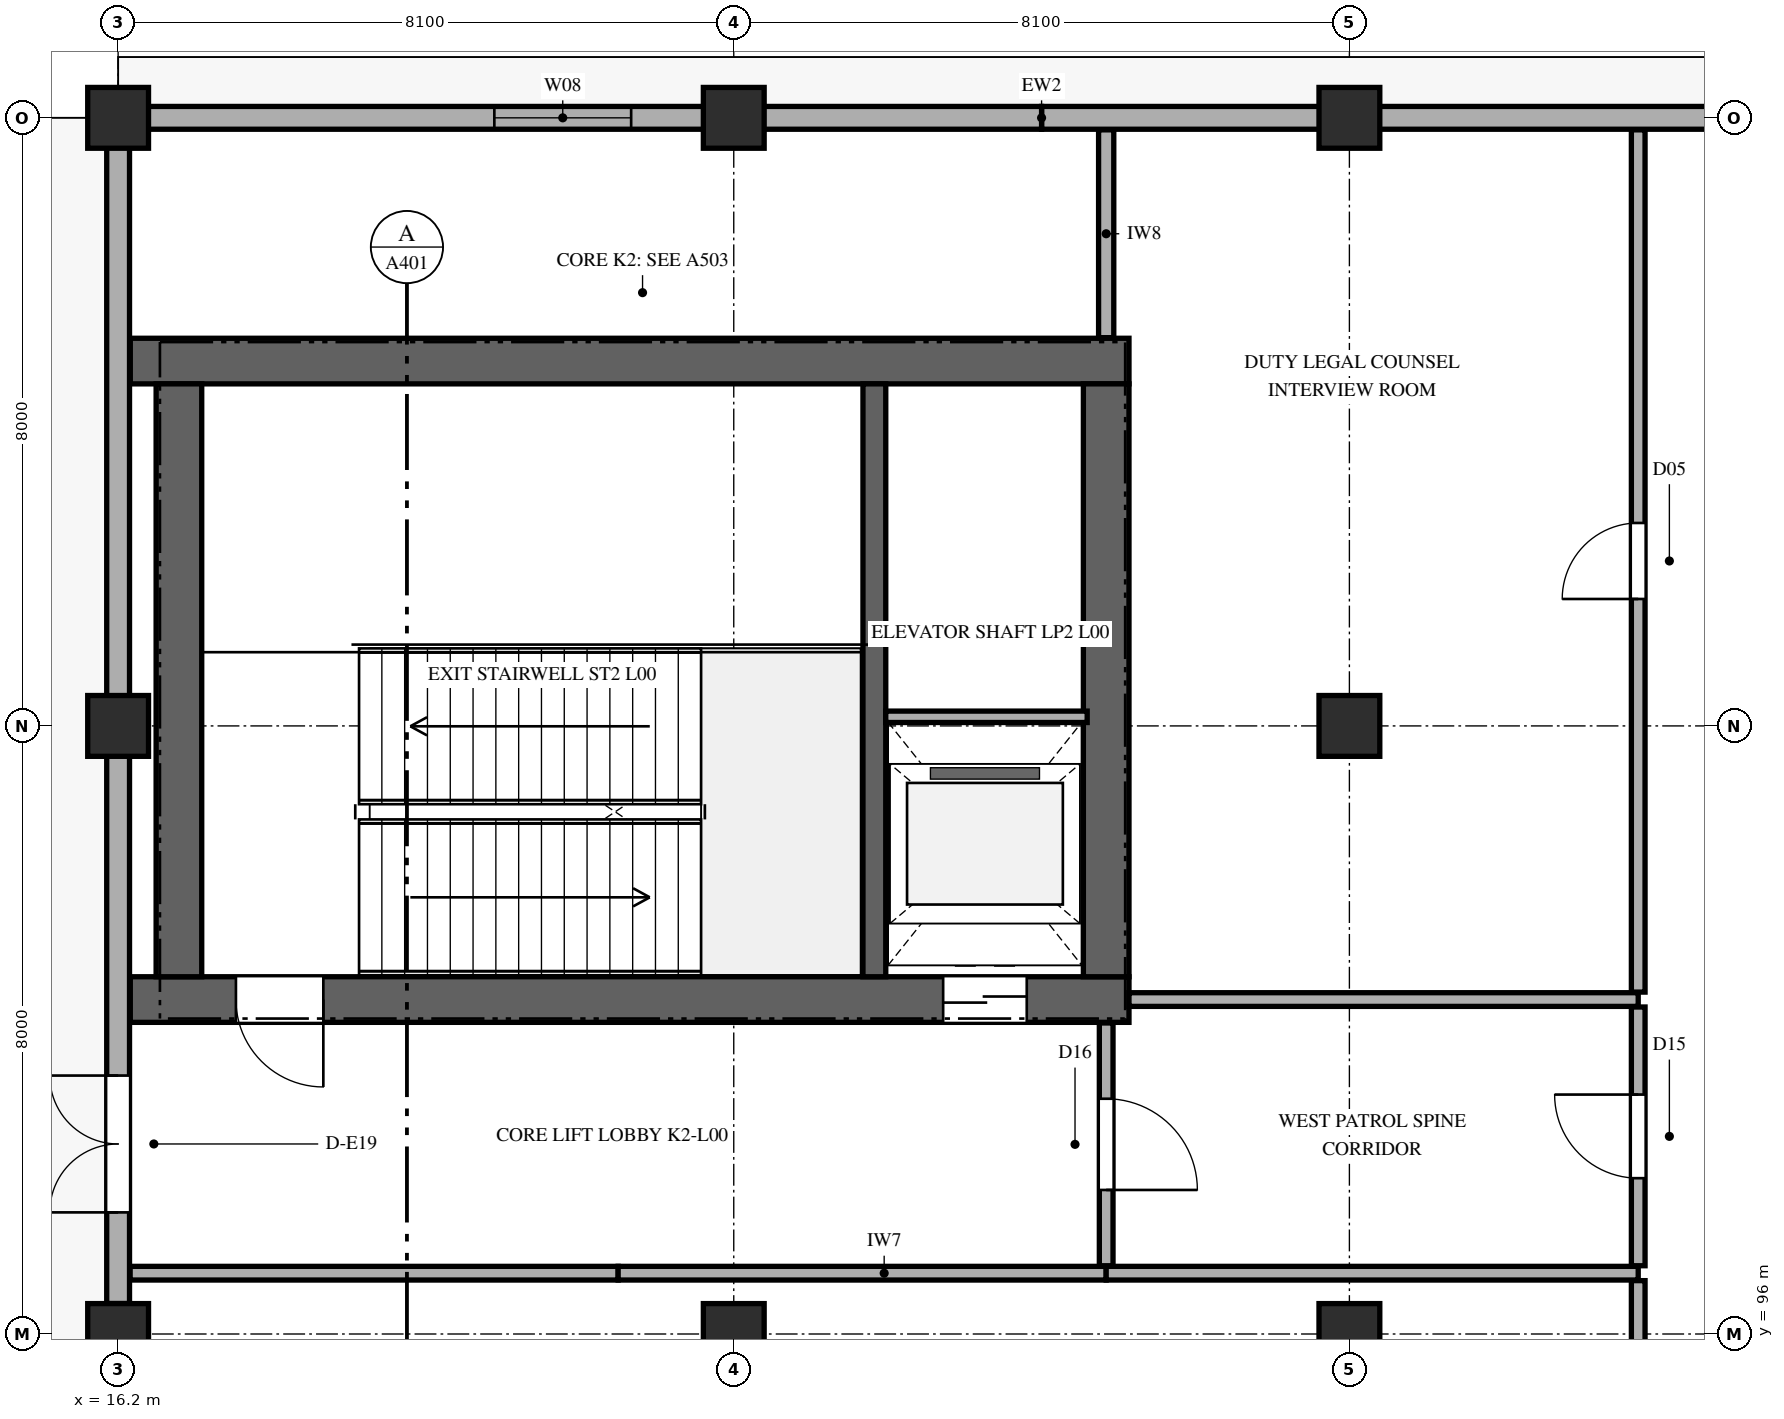
"""IFC4 building model, lengths in metres.
Left out: names, types, materials, properties, quantities, classifications, styles, units other than length and angle.
Written with IfcOpenShell. Run it as: python <this file> out.ifc"""

import sys

from ifc_helpers import new_model, si_unit, direction, frame, frame_2d, origin, origin_2d, place, context, subcontext, project, spatial, rectangle, extrude, element, fill, save


model = new_model("IFC4")
c1 = context("Model", 3, precision=1e-05, world=origin(), true_north=direction((0.0, 1.0)))
c2 = subcontext(c1, "Body", "Model", "MODEL_VIEW")
j1 = project(units=[si_unit("LENGTHUNIT", "METRE"), si_unit("PLANEANGLEUNIT", "RADIAN")], contexts=[c1])
p1 = place(None, origin())
s1 = spatial("IfcSite", under=j1, at=p1, CompositionType="ELEMENT")
p2 = place(p1, origin())
s2 = spatial("IfcBuilding", under=s1, at=p2, CompositionType="ELEMENT")
p3 = place(p2, origin())
s3 = spatial("IfcBuildingStorey", under=s2, at=p3, CompositionType="ELEMENT", Elevation=0.0)
p4 = place(p3, frame((16.36, 100.4, 0.0), z_axis=(0.0, 0.0, 1.0), x_axis=(1.0, 0.0, 0.0)))
e1 = element("IfcWall", 1, at=p4, inside=s3, PredefinedType="SHEAR", context=c2, shape_type="SweptSolid", body=[
    extrude(rectangle(XDim=13.14, YDim=0.6, at=frame_2d((6.57, 0.0))), origin(), (0.0, 0.0, 1.0), 5.4),
])
p5 = place(p4, frame((1.39, 0.0, 0.0)))
e2 = element("IfcOpeningElement", 2, at=p5, cuts=e1, PredefinedType="OPENING", context=c2, shape_type="SweptSolid", body=[
    extrude(rectangle(XDim=1.15, YDim=2.25, at=frame_2d((0.575, 1.125))), frame((0.0, 0.31, 0.0), z_axis=(0.0, -1.0, 0.0), x_axis=(1.0, 0.0, 0.0)), (0.0, 0.0, 1.0), 0.62),
])
p6 = place(p4, frame((10.695, 0.0, 0.0)))
e3 = element("IfcOpeningElement", 3, at=p6, cuts=e1, PredefinedType="OPENING", context=c2, shape_type="SweptSolid", body=[
    extrude(rectangle(XDim=1.1, YDim=2.2, at=frame_2d((0.55, 1.1))), frame((0.0, 0.31, 0.0), z_axis=(0.0, -1.0, 0.0), x_axis=(1.0, 0.0, 0.0)), (0.0, 0.0, 1.0), 0.62),
])
p7 = place(p3, frame((16.36, 108.8, 0.0), z_axis=(0.0, 0.0, 1.0), x_axis=(1.0, 0.0, 0.0)))
e4 = element("IfcWall", 4, at=p7, inside=s3, PredefinedType="SHEAR", context=c2, shape_type="SweptSolid", body=[
    extrude(rectangle(XDim=13.14, YDim=0.6, at=frame_2d((6.57, 0.0))), origin(), (0.0, 0.0, 1.0), 5.4),
])
for number, where, z_axis, x_axis in (
    (5, (17.0, 100.7, 0.0), (0.0, 0.0, 1.0), (0.0, 1.0, 0.0)),
    (6, (29.2, 100.7, 0.0), (0.0, 0.0, 1.0), (0.0, 1.0, 0.0)),
):
    element("IfcWall", number, at=place(p3, frame(where, z_axis=z_axis, x_axis=x_axis)), inside=s3, PredefinedType="SHEAR", context=c2, shape_type="SweptSolid", body=[
        extrude(rectangle(XDim=7.8, YDim=0.6, at=frame_2d((3.9, 0.0))), origin(), (0.0, 0.0, 1.0), 5.4),
    ])
p8 = place(p3, frame((26.15, 100.7, 0.0), z_axis=(0.0, 0.0, 1.0), x_axis=(0.0, 1.0, 0.0)))
e7 = element("IfcWall", 7, at=p8, inside=s3, PredefinedType="SHEAR", context=c2, shape_type="SweptSolid", body=[
    extrude(rectangle(XDim=7.8, YDim=0.3, at=frame_2d((3.9, 0.0))), origin(), (0.0, 0.0, 1.0), 5.4),
])
for number, where, z_axis, x_axis in (
    (8, (16.2, 96.0, 0.0), (0.0, 0.0, 1.0), (1.0, 0.0, 0.0)),
    (9, (16.2, 104.0, 0.0), (0.0, 0.0, 1.0), (1.0, 0.0, 0.0)),
    (10, (16.2, 112.0, 0.0), (0.0, 0.0, 1.0), (1.0, 0.0, 0.0)),
    (11, (24.3, 96.0, 0.0), (0.0, 0.0, 1.0), (1.0, 0.0, 0.0)),
    (12, (24.3, 112.0, 0.0), (0.0, 0.0, 1.0), (1.0, 0.0, 0.0)),
    (13, (32.4, 96.0, 0.0), (0.0, 0.0, 1.0), (1.0, 0.0, 0.0)),
    (14, (32.4, 104.0, 0.0), (0.0, 0.0, 1.0), (1.0, 0.0, 0.0)),
    (15, (32.4, 112.0, 0.0), (0.0, 0.0, 1.0), (1.0, 0.0, 0.0)),
):
    element("IfcColumn", number, at=place(p3, frame(where, z_axis=z_axis, x_axis=x_axis)), inside=s3, PredefinedType="COLUMN", context=c2, shape_type="SweptSolid", body=[
        extrude(rectangle(XDim=0.8, YDim=0.8, at=origin_2d()), origin(), (0.0, 0.0, 1.0), 5.4),
    ])
p9 = place(p3, frame((40.5, 112.0, 0.0), z_axis=(0.0, 0.0, 1.0), x_axis=(-1.0, 0.0, 0.0)))
e16 = element("IfcWall", 16, at=p9, inside=s3, PredefinedType="SOLIDWALL", context=c2, shape_type="SweptSolid", body=[
    extrude(rectangle(XDim=12.15, YDim=0.3, at=frame_2d((6.075, 0.0))), origin(), (0.0, 0.0, 1.0), 4.412),
])
p10 = place(p3, frame((28.35, 112.0, 0.0), z_axis=(0.0, 0.0, 1.0), x_axis=(-1.0, 0.0, 0.0)))
e17 = element("IfcWall", 17, at=p10, inside=s3, PredefinedType="SOLIDWALL", context=c2, shape_type="SweptSolid", body=[
    extrude(rectangle(XDim=12.15, YDim=0.3, at=frame_2d((6.075, 0.0))), origin(), (0.0, 0.0, 1.0), 4.412),
])
p11 = place(p10, frame((5.4, 0.0, 0.95)))
e18 = element("IfcOpeningElement", 18, at=p11, cuts=e17, PredefinedType="OPENING", context=c2, shape_type="SweptSolid", body=[
    extrude(rectangle(XDim=1.8, YDim=1.5, at=frame_2d((0.9, 0.75))), frame((0.0, 0.16, 0.0), z_axis=(0.0, -1.0, 0.0), x_axis=(1.0, 0.0, 0.0)), (0.0, 0.0, 1.0), 0.32),
])
p12 = place(p3, frame((16.2, 112.0, 0.0), z_axis=(0.0, 0.0, 1.0), x_axis=(0.0, -1.0, 0.0)))
e19 = element("IfcWall", 19, at=p12, inside=s3, PredefinedType="SOLIDWALL", context=c2, shape_type="SweptSolid", body=[
    extrude(rectangle(XDim=15.6, YDim=0.3, at=frame_2d((7.8, 0.0))), origin(), (0.0, 0.0, 1.0), 4.512),
])
p13 = place(p12, frame((12.6, 0.0, 0.0)))
e20 = element("IfcOpeningElement", 20, at=p13, cuts=e19, PredefinedType="OPENING", context=c2, shape_type="SweptSolid", body=[
    extrude(rectangle(XDim=1.8, YDim=2.4, at=frame_2d((0.9, 1.2))), frame((0.0, 0.16, 0.0), z_axis=(0.0, -1.0, 0.0), x_axis=(1.0, 0.0, 0.0)), (0.0, 0.0, 1.0), 0.32),
])
p14 = place(p3, frame((16.2, 96.4, 0.0), z_axis=(0.0, 0.0, 1.0), x_axis=(0.0, -1.0, 0.0)))
e21 = element("IfcWall", 21, at=p14, inside=s3, PredefinedType="SOLIDWALL", context=c2, shape_type="SweptSolid", body=[
    extrude(rectangle(XDim=15.6, YDim=0.3, at=frame_2d((7.8, 0.0))), origin(), (0.0, 0.0, 1.0), 4.512),
])
p15 = place(p14, frame((4.51, 0.0, 0.0)))
e22 = element("IfcOpeningElement", 22, at=p15, cuts=e21, PredefinedType="OPENING", context=c2, shape_type="SweptSolid", body=[
    extrude(rectangle(XDim=1.9, YDim=2.4, at=frame_2d((0.95, 1.2))), frame((0.0, 0.16, 0.0), z_axis=(0.0, -1.0, 0.0), x_axis=(1.0, 0.0, 0.0)), (0.0, 0.0, 1.0), 0.32),
])
p16 = place(p3, frame((26.3, 104.12, 0.0), z_axis=(0.0, 0.0, 1.0), x_axis=(1.0, 0.0, 0.0)))
e23 = element("IfcWall", 23, at=p16, inside=s3, PredefinedType="PARTITIONING", context=c2, shape_type="SweptSolid", body=[
    extrude(rectangle(XDim=2.65, YDim=0.15, at=frame_2d((1.325, 0.0))), origin(), (0.0, 0.0, 1.0), 5.12),
])
p17 = place(p3, frame((16.358, 96.8, 0.0), z_axis=(0.0, 0.0, 1.0), x_axis=(1.0, 0.0, 0.0)))
e24 = element("IfcWall", 24, at=p17, inside=s3, PredefinedType="PARTITIONING", context=c2, shape_type="SweptSolid", body=[
    extrude(rectangle(XDim=6.421, YDim=0.18, at=frame_2d((3.21, 0.0))), origin(), (0.0, 0.0, 1.0), 5.12),
])
p18 = place(p3, frame((22.779, 96.8, 0.0), z_axis=(0.0, 0.0, 1.0), x_axis=(1.0, 0.0, 0.0)))
e25 = element("IfcWall", 25, at=p18, inside=s3, PredefinedType="PARTITIONING", context=c2, shape_type="SweptSolid", body=[
    extrude(rectangle(XDim=6.421, YDim=0.18, at=frame_2d((3.21, 0.0))), origin(), (0.0, 0.0, 1.0), 5.12),
])
p19 = place(p3, frame((29.2, 96.8, 0.0), z_axis=(0.0, 0.0, 1.0), x_axis=(1.0, 0.0, 0.0)))
e26 = element("IfcWall", 26, at=p19, inside=s3, PredefinedType="PARTITIONING", context=c2, shape_type="SweptSolid", body=[
    extrude(rectangle(XDim=7.0, YDim=0.18, at=frame_2d((3.5, 0.0))), origin(), (0.0, 0.0, 1.0), 5.12),
])
p20 = place(p3, frame((29.5, 100.4, 0.0), z_axis=(0.0, 0.0, 1.0), x_axis=(1.0, 0.0, 0.0)))
e27 = element("IfcWall", 27, at=p20, inside=s3, PredefinedType="PARTITIONING", context=c2, shape_type="SweptSolid", body=[
    extrude(rectangle(XDim=6.7, YDim=0.18, at=frame_2d((3.35, 0.0))), origin(), (0.0, 0.0, 1.0), 5.12),
])
p21 = place(p3, frame((29.2, 96.898, 0.0), z_axis=(0.0, 0.0, 1.0), x_axis=(0.0, 1.0, 0.0)))
e28 = element("IfcWall", 28, at=p21, inside=s3, PredefinedType="PARTITIONING", context=c2, shape_type="SweptSolid", body=[
    extrude(rectangle(XDim=3.194, YDim=0.18, at=frame_2d((1.597, 0.0))), origin(), (0.0, 0.0, 1.0), 5.12),
])
p22 = place(p21, frame((0.997, 0.0, 0.0)))
e29 = element("IfcOpeningElement", 29, at=p22, cuts=e28, PredefinedType="OPENING", context=c2, shape_type="SweptSolid", body=[
    extrude(rectangle(XDim=1.2, YDim=2.2, at=frame_2d((0.6, 1.1))), frame((0.0, 0.1, 0.0), z_axis=(0.0, -1.0, 0.0), x_axis=(1.0, 0.0, 0.0)), (0.0, 0.0, 1.0), 0.2),
])
p23 = place(p3, frame((29.2, 109.108, 0.0), z_axis=(0.0, 0.0, 1.0), x_axis=(0.0, 1.0, 0.0)))
e30 = element("IfcWall", 30, at=p23, inside=s3, PredefinedType="PARTITIONING", context=c2, shape_type="SweptSolid", body=[
    extrude(rectangle(XDim=2.734, YDim=0.2, at=frame_2d((1.367, 0.0))), origin(), (0.0, 0.0, 1.0), 5.12),
])
p24 = place(p3, frame((36.2, 83.068, 0.0), z_axis=(0.0, 0.0, 1.0), x_axis=(0.0, 1.0, 0.0)))
e31 = element("IfcWall", 31, at=p24, inside=s3, PredefinedType="PARTITIONING", context=c2, shape_type="SweptSolid", body=[
    extrude(rectangle(XDim=13.634, YDim=0.18, at=frame_2d((6.817, 0.0))), origin(), (0.0, 0.0, 1.0), 4.705),
])
p25 = place(p24, frame((6.267, 0.0, 0.0)))
e32 = element("IfcOpeningElement", 32, at=p25, cuts=e31, PredefinedType="OPENING", context=c2, shape_type="SweptSolid", body=[
    extrude(rectangle(XDim=1.1, YDim=2.2, at=frame_2d((0.55, 1.1))), frame((0.0, 0.1, 0.0), z_axis=(0.0, -1.0, 0.0), x_axis=(1.0, 0.0, 0.0)), (0.0, 0.0, 1.0), 0.2),
])
p26 = place(p3, frame((36.2, 96.898, 0.0), z_axis=(0.0, 0.0, 1.0), x_axis=(0.0, 1.0, 0.0)))
e33 = element("IfcWall", 33, at=p26, inside=s3, PredefinedType="PARTITIONING", context=c2, shape_type="SweptSolid", body=[
    extrude(rectangle(XDim=3.404, YDim=0.18, at=frame_2d((1.702, 0.0))), origin(), (0.0, 0.0, 1.0), 4.809),
])
p27 = place(p26, frame((1.152, 0.0, 0.0)))
e34 = element("IfcOpeningElement", 34, at=p27, cuts=e33, PredefinedType="OPENING", context=c2, shape_type="SweptSolid", body=[
    extrude(rectangle(XDim=1.1, YDim=2.2, at=frame_2d((0.55, 1.1))), frame((0.0, 0.1, 0.0), z_axis=(0.0, -1.0, 0.0), x_axis=(1.0, 0.0, 0.0)), (0.0, 0.0, 1.0), 0.2),
])
p28 = place(p3, frame((36.2, 100.498, 0.0), z_axis=(0.0, 0.0, 1.0), x_axis=(0.0, 1.0, 0.0)))
e35 = element("IfcWall", 35, at=p28, inside=s3, PredefinedType="PARTITIONING", context=c2, shape_type="SweptSolid", body=[
    extrude(rectangle(XDim=11.344, YDim=0.18, at=frame_2d((5.672, 0.0))), origin(), (0.0, 0.0, 1.0), 4.758),
])
p29 = place(p28, frame((5.172, 0.0, 0.0)))
e36 = element("IfcOpeningElement", 36, at=p29, cuts=e35, PredefinedType="OPENING", context=c2, shape_type="SweptSolid", body=[
    extrude(rectangle(XDim=1.0, YDim=2.2, at=frame_2d((0.5, 1.1))), frame((0.0, 0.1, 0.0), z_axis=(0.0, -1.0, 0.0), x_axis=(1.0, 0.0, 0.0)), (0.0, 0.0, 1.0), 0.2),
])
p30 = place(p11, origin())
e37 = element("IfcWindow", 37, at=p30, inside=s3, PartitioningType="DOUBLE_PANEL_VERTICAL", PredefinedType="WINDOW", context=c2, shape_type="SweptSolid", body=[
    extrude(rectangle(XDim=1.8, YDim=1.5, at=frame_2d((0.9, 0.75))), frame((0.0, 0.03, 0.0), z_axis=(0.0, -1.0, 0.0), x_axis=(1.0, 0.0, 0.0)), (0.0, 0.0, 1.0), 0.06),
])
fill(e18, e37)
p31 = place(p13, frame((1.8, 0.0, 0.0), z_axis=(0.0, 0.0, 1.0), x_axis=(-1.0, 0.0, 0.0)))
e38 = element("IfcDoor", 38, at=p31, inside=s3, OperationType="DOUBLE_DOOR_SINGLE_SWING", PredefinedType="DOOR", context=c2, shape_type="SweptSolid", body=[
    extrude(rectangle(XDim=1.8, YDim=2.4, at=frame_2d((0.9, 1.2))), frame((0.0, 0.025, 0.0), z_axis=(0.0, -1.0, 0.0), x_axis=(1.0, 0.0, 0.0)), (0.0, 0.0, 1.0), 0.05),
])
fill(e20, e38)
p32 = place(p5, frame((1.15, 0.0, 0.0), z_axis=(0.0, 0.0, 1.0), x_axis=(-1.0, 0.0, 0.0)))
e39 = element("IfcDoor", 39, at=p32, inside=s3, OperationType="SINGLE_SWING_RIGHT", PredefinedType="DOOR", context=c2, shape_type="SweptSolid", body=[
    extrude(rectangle(XDim=1.15, YDim=2.25, at=frame_2d((0.575, 1.125))), frame((0.0, 0.025, 0.0), z_axis=(0.0, -1.0, 0.0), x_axis=(1.0, 0.0, 0.0)), (0.0, 0.0, 1.0), 0.05),
])
fill(e2, e39)
p33 = place(p6, frame((1.1, 0.0, 0.0), z_axis=(0.0, 0.0, 1.0), x_axis=(-1.0, 0.0, 0.0)))
e40 = element("IfcDoor", 40, at=p33, inside=s3, OperationType="DOUBLE_DOOR_SLIDING", PredefinedType="DOOR", context=c2, shape_type="SweptSolid", body=[
    extrude(rectangle(XDim=1.1, YDim=2.2, at=frame_2d((0.55, 1.1))), frame((0.0, 0.025, 0.0), z_axis=(0.0, -1.0, 0.0), x_axis=(1.0, 0.0, 0.0)), (0.0, 0.0, 1.0), 0.05),
])
fill(e3, e40)
p34 = place(p22, frame((1.2, 0.0, 0.0), z_axis=(0.0, 0.0, 1.0), x_axis=(-1.0, 0.0, 0.0)))
e41 = element("IfcDoor", 41, at=p34, inside=s3, OperationType="SINGLE_SWING_LEFT", PredefinedType="DOOR", context=c2, shape_type="SweptSolid", body=[
    extrude(rectangle(XDim=1.2, YDim=2.2, at=frame_2d((0.6, 1.1))), frame((0.0, 0.025, 0.0), z_axis=(0.0, -1.0, 0.0), x_axis=(1.0, 0.0, 0.0)), (0.0, 0.0, 1.0), 0.05),
])
fill(e29, e41)
p35 = place(p27, origin())
e42 = element("IfcDoor", 42, at=p35, inside=s3, OperationType="SINGLE_SWING_RIGHT", PredefinedType="DOOR", context=c2, shape_type="SweptSolid", body=[
    extrude(rectangle(XDim=1.1, YDim=2.2, at=frame_2d((0.55, 1.1))), frame((0.0, 0.025, 0.0), z_axis=(0.0, -1.0, 0.0), x_axis=(1.0, 0.0, 0.0)), (0.0, 0.0, 1.0), 0.05),
])
fill(e34, e42)
p36 = place(p29, origin())
e43 = element("IfcDoor", 43, at=p36, inside=s3, OperationType="SINGLE_SWING_LEFT", PredefinedType="DOOR", context=c2, shape_type="SweptSolid", body=[
    extrude(rectangle(XDim=1.0, YDim=2.2, at=frame_2d((0.5, 1.1))), frame((0.0, 0.025, 0.0), z_axis=(0.0, -1.0, 0.0), x_axis=(1.0, 0.0, 0.0)), (0.0, 0.0, 1.0), 0.05),
])
fill(e36, e43)
save(model, sys.argv[1])
